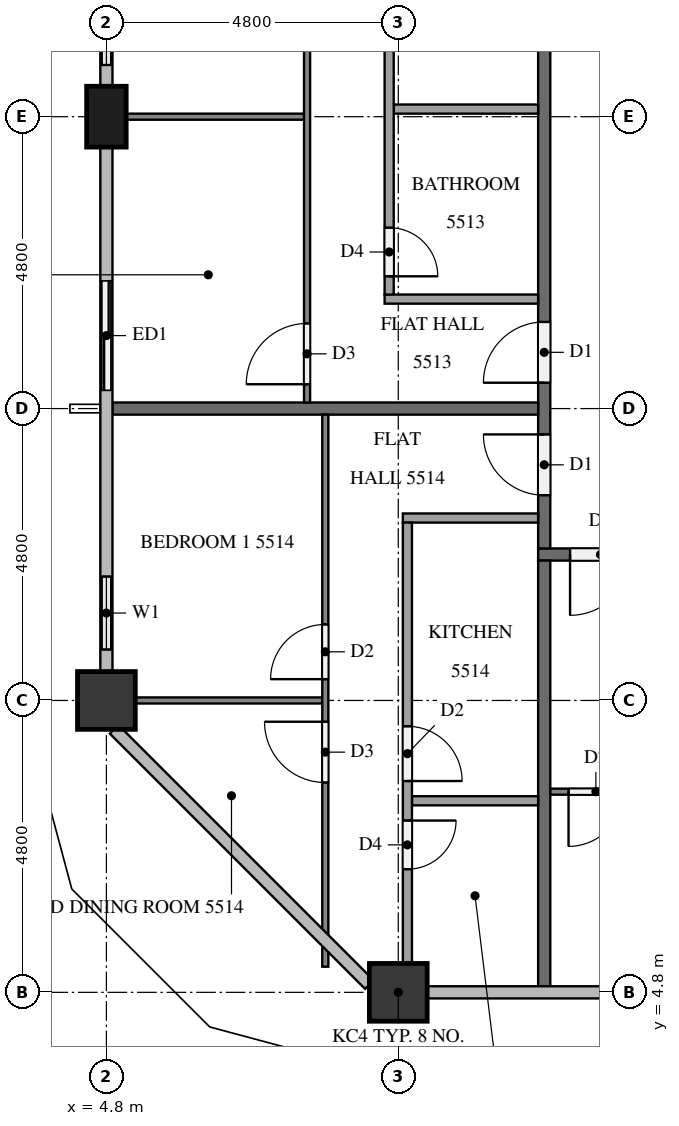
"""IFC4 building model, lengths in metres.
Left out: names, types, materials, properties, quantities, classifications, styles, units other than length and angle.
Written with IfcOpenShell. Run it as: python <this file> out.ifc"""

import sys

from ifc_helpers import new_model, si_unit, direction, frame, frame_2d, origin, origin_2d, place, context, subcontext, project, spatial, rectangle, extrude, element, fill, save


model = new_model("IFC4")
c1 = context("Model", 3, precision=1e-05, world=origin(), true_north=direction((0.0, 1.0)))
c2 = subcontext(c1, "Body", "Model", "MODEL_VIEW")
j1 = project(units=[si_unit("LENGTHUNIT", "METRE"), si_unit("PLANEANGLEUNIT", "RADIAN")], contexts=[c1])
p1 = place(None, origin())
s1 = spatial("IfcSite", under=j1, at=p1, CompositionType="ELEMENT")
p2 = place(p1, origin())
s2 = spatial("IfcBuilding", under=s1, at=p2, CompositionType="ELEMENT")
p3 = place(p2, frame((0.0, 0.0, 212.3)))
s3 = spatial("IfcBuildingStorey", under=s2, at=p3, CompositionType="ELEMENT", Elevation=212.3)
p4 = place(p3, frame((9.6, 4.8, 0.0), z_axis=(0.0, 0.0, 1.0), x_axis=(1.0, 0.0, 0.0)))
e1 = element("IfcColumn", 1, at=p4, inside=s3, PredefinedType="COLUMN", context=c2, shape_type="SweptSolid", body=[
    extrude(rectangle(XDim=0.95, YDim=0.95, at=origin_2d()), origin(), (0.0, 0.0, 1.0), 3.2),
])
p5 = place(p3, frame((4.8, 19.2, 0.0), z_axis=(0.0, 0.0, 1.0), x_axis=(0.0, 1.0, 0.0)))
e2 = element("IfcColumn", 2, at=p5, inside=s3, PredefinedType="COLUMN", context=c2, shape_type="SweptSolid", body=[
    extrude(rectangle(XDim=1.0, YDim=0.65, at=origin_2d()), origin(), (0.0, 0.0, 1.0), 3.2),
])
p6 = place(p3, frame((4.8, 9.6, 0.0), z_axis=(0.0, 0.0, 1.0), x_axis=(1.0, 0.0, 0.0)))
e3 = element("IfcColumn", 3, at=p6, inside=s3, PredefinedType="COLUMN", context=c2, shape_type="SweptSolid", body=[
    extrude(rectangle(XDim=0.95, YDim=0.95, at=origin_2d()), origin(), (0.0, 0.0, 1.0), 3.2),
])
p7 = place(p3, frame((4.8, 21.6, 0.0), z_axis=(0.0, 0.0, 1.0), x_axis=(0.0, -1.0, 0.0)))
e4 = element("IfcWall", 4, at=p7, inside=s3, PredefinedType="SOLIDWALL", context=c2, shape_type="SweptSolid", body=[
    extrude(rectangle(XDim=1.9, YDim=0.15, at=frame_2d((0.95, 0.0))), origin(), (0.0, 0.0, 1.0), 3.2),
])
p8 = place(p7, frame((0.35, 0.0, 0.9)))
e5 = element("IfcOpeningElement", 5, at=p8, cuts=e4, PredefinedType="OPENING", context=c2, shape_type="SweptSolid", body=[
    extrude(rectangle(XDim=1.2, YDim=1.4, at=frame_2d((0.6, 0.7))), frame((0.0, 0.085, 0.0), z_axis=(0.0, -1.0, 0.0), x_axis=(1.0, 0.0, 0.0)), (0.0, 0.0, 1.0), 0.17),
])
p9 = place(p3, frame((4.8, 16.8, 0.0), z_axis=(0.0, 0.0, 1.0), x_axis=(0.0, -1.0, 0.0)))
e6 = element("IfcWall", 6, at=p9, inside=s3, PredefinedType="SOLIDWALL", context=c2, shape_type="SweptSolid", body=[
    extrude(rectangle(XDim=2.4, YDim=0.15, at=frame_2d((1.2, 0.0))), origin(), (0.0, 0.0, 1.0), 3.2),
])
p10 = place(p9, frame((0.3, 0.0, 0.0)))
e7 = element("IfcOpeningElement", 7, at=p10, cuts=e6, PredefinedType="OPENING", context=c2, shape_type="SweptSolid", body=[
    extrude(rectangle(XDim=1.8, YDim=2.4, at=frame_2d((0.9, 1.2))), frame((0.0, 0.085, 0.0), z_axis=(0.0, -1.0, 0.0), x_axis=(1.0, 0.0, 0.0)), (0.0, 0.0, 1.0), 0.17),
])
p11 = place(p3, frame((4.8, 12.0, 0.0), z_axis=(0.0, 0.0, 1.0), x_axis=(0.0, -1.0, 0.0)))
e8 = element("IfcWall", 8, at=p11, inside=s3, PredefinedType="SOLIDWALL", context=c2, shape_type="SweptSolid", body=[
    extrude(rectangle(XDim=1.925, YDim=0.15, at=frame_2d((0.962, 0.0))), origin(), (0.0, 0.0, 1.0), 3.2),
])
p12 = place(p11, frame((0.363, 0.0, 0.9)))
e9 = element("IfcOpeningElement", 9, at=p12, cuts=e8, PredefinedType="OPENING", context=c2, shape_type="SweptSolid", body=[
    extrude(rectangle(XDim=1.2, YDim=1.4, at=frame_2d((0.6, 0.7))), frame((0.0, 0.085, 0.0), z_axis=(0.0, -1.0, 0.0), x_axis=(1.0, 0.0, 0.0)), (0.0, 0.0, 1.0), 0.17),
])
p13 = place(p3, frame((50.5, 12.0, 0.0), z_axis=(0.0, 0.0, 1.0), x_axis=(-1.0, 0.0, 0.0)))
e10 = element("IfcWall", 10, at=p13, inside=s3, PredefinedType="PARTITIONING", context=c2, shape_type="SweptSolid", body=[
    extrude(rectangle(XDim=38.6, YDim=0.2, at=frame_2d((19.3, 0.0))), origin(), (0.0, 0.0, 1.0), 3.2),
])
p14 = place(p13, frame((37.075, 0.0, 0.0)))
e11 = element("IfcOpeningElement", 11, at=p14, cuts=e10, PredefinedType="OPENING", context=c2, shape_type="SweptSolid", body=[
    extrude(rectangle(XDim=1.0, YDim=2.1, at=frame_2d((0.5, 1.05))), frame((0.0, 0.11, 0.0), z_axis=(0.0, -1.0, 0.0), x_axis=(1.0, 0.0, 0.0)), (0.0, 0.0, 1.0), 0.22),
])
p15 = place(p13, frame((20.275, 0.0, 0.0)))
e12 = element("IfcOpeningElement", 12, at=p15, cuts=e10, PredefinedType="OPENING", context=c2, shape_type="SweptSolid", body=[
    extrude(rectangle(XDim=1.0, YDim=2.1, at=frame_2d((0.5, 1.05))), frame((0.0, 0.11, 0.0), z_axis=(0.0, -1.0, 0.0), x_axis=(1.0, 0.0, 0.0)), (0.0, 0.0, 1.0), 0.22),
])
p16 = place(p13, frame((0.525, 0.0, 0.0)))
e13 = element("IfcOpeningElement", 13, at=p16, cuts=e10, PredefinedType="OPENING", context=c2, shape_type="SweptSolid", body=[
    extrude(rectangle(XDim=1.0, YDim=2.1, at=frame_2d((0.5, 1.05))), frame((0.0, 0.11, 0.0), z_axis=(0.0, -1.0, 0.0), x_axis=(1.0, 0.0, 0.0)), (0.0, 0.0, 1.0), 0.22),
])
p17 = place(p3, frame((12.0, 12.1, 0.0), z_axis=(0.0, 0.0, 1.0), x_axis=(0.0, 1.0, 0.0)))
e14 = element("IfcWall", 14, at=p17, inside=s3, PredefinedType="PARTITIONING", context=c2, shape_type="SweptSolid", body=[
    extrude(rectangle(XDim=28.6, YDim=0.2, at=frame_2d((14.3, 0.0))), origin(), (0.0, 0.0, 1.0), 3.2),
])
p18 = place(p17, frame((27.275, 0.0, 0.0)))
e15 = element("IfcOpeningElement", 15, at=p18, cuts=e14, PredefinedType="OPENING", context=c2, shape_type="SweptSolid", body=[
    extrude(rectangle(XDim=1.0, YDim=2.1, at=frame_2d((0.5, 1.05))), frame((0.0, 0.11, 0.0), z_axis=(0.0, -1.0, 0.0), x_axis=(1.0, 0.0, 0.0)), (0.0, 0.0, 1.0), 0.22),
])
p19 = place(p17, frame((12.325, 0.0, 0.0)))
e16 = element("IfcOpeningElement", 16, at=p19, cuts=e14, PredefinedType="OPENING", context=c2, shape_type="SweptSolid", body=[
    extrude(rectangle(XDim=1.0, YDim=2.1, at=frame_2d((0.5, 1.05))), frame((0.0, 0.11, 0.0), z_axis=(0.0, -1.0, 0.0), x_axis=(1.0, 0.0, 0.0)), (0.0, 0.0, 1.0), 0.22),
])
p20 = place(p17, frame((2.725, 0.0, 0.0)))
e17 = element("IfcOpeningElement", 17, at=p20, cuts=e14, PredefinedType="OPENING", context=c2, shape_type="SweptSolid", body=[
    extrude(rectangle(XDim=1.0, YDim=2.1, at=frame_2d((0.5, 1.05))), frame((0.0, 0.11, 0.0), z_axis=(0.0, -1.0, 0.0), x_axis=(1.0, 0.0, 0.0)), (0.0, 0.0, 1.0), 0.22),
])
p21 = place(p17, frame((0.875, 0.0, 0.0)))
e18 = element("IfcOpeningElement", 18, at=p21, cuts=e14, PredefinedType="OPENING", context=c2, shape_type="SweptSolid", body=[
    extrude(rectangle(XDim=1.0, YDim=2.1, at=frame_2d((0.5, 1.05))), frame((0.0, 0.11, 0.0), z_axis=(0.0, -1.0, 0.0), x_axis=(1.0, 0.0, 0.0)), (0.0, 0.0, 1.0), 0.22),
])
for number, where, z_axis, x_axis in (
    (19, (12.0, 4.9, 0.0), (0.0, 0.0, 1.0), (0.0, 1.0, 0.0)),
    (20, (4.9, 14.4, 0.0), (0.0, 0.0, 1.0), (1.0, 0.0, 0.0)),
):
    element("IfcWall", number, at=place(p3, frame(where, z_axis=z_axis, x_axis=x_axis)), inside=s3, PredefinedType="PARTITIONING", context=c2, shape_type="SweptSolid", body=[
        extrude(rectangle(XDim=7.0, YDim=0.2, at=frame_2d((3.5, 0.0))), origin(), (0.0, 0.0, 1.0), 3.2),
    ])
p22 = place(p3, frame((28.7, 8.1, 0.0), z_axis=(0.0, 0.0, 1.0), x_axis=(-1.0, 0.0, 0.0)))
e21 = element("IfcWall", 21, at=p22, inside=s3, PredefinedType="PARTITIONING", context=c2, shape_type="SweptSolid", body=[
    extrude(rectangle(XDim=16.6, YDim=0.1, at=frame_2d((8.3, 0.0))), origin(), (0.0, 0.0, 1.0), 3.2),
])
p23 = place(p22, frame((15.4, 0.0, 0.0)))
e22 = element("IfcOpeningElement", 22, at=p23, cuts=e21, PredefinedType="OPENING", context=c2, shape_type="SweptSolid", body=[
    extrude(rectangle(XDim=0.9, YDim=2.1, at=frame_2d((0.45, 1.05))), frame((0.0, 0.06, 0.0), z_axis=(0.0, -1.0, 0.0), x_axis=(1.0, 0.0, 0.0)), (0.0, 0.0, 1.0), 0.12),
])
p24 = place(p22, frame((5.05, 0.0, 0.0)))
e23 = element("IfcOpeningElement", 23, at=p24, cuts=e21, PredefinedType="OPENING", context=c2, shape_type="SweptSolid", body=[
    extrude(rectangle(XDim=1.0, YDim=2.1, at=frame_2d((0.5, 1.05))), frame((0.0, 0.06, 0.0), z_axis=(0.0, -1.0, 0.0), x_axis=(1.0, 0.0, 0.0)), (0.0, 0.0, 1.0), 0.12),
])
p25 = place(p22, frame((3.45, 0.0, 0.0)))
e24 = element("IfcOpeningElement", 24, at=p25, cuts=e21, PredefinedType="OPENING", context=c2, shape_type="SweptSolid", body=[
    extrude(rectangle(XDim=0.9, YDim=2.1, at=frame_2d((0.45, 1.05))), frame((0.0, 0.06, 0.0), z_axis=(0.0, -1.0, 0.0), x_axis=(1.0, 0.0, 0.0)), (0.0, 0.0, 1.0), 0.12),
])
p26 = place(p3, frame((8.05, 19.2, 0.0), z_axis=(0.0, 0.0, 1.0), x_axis=(-1.0, 0.0, 0.0)))
e25 = element("IfcWall", 25, at=p26, inside=s3, PredefinedType="PARTITIONING", context=c2, shape_type="SweptSolid", body=[
    extrude(rectangle(XDim=2.925, YDim=0.1, at=frame_2d((1.462, 0.0))), origin(), (0.0, 0.0, 1.0), 3.2),
])
p27 = place(p3, frame((8.1, 14.5, 0.0), z_axis=(0.0, 0.0, 1.0), x_axis=(0.0, 1.0, 0.0)))
e26 = element("IfcWall", 26, at=p27, inside=s3, PredefinedType="PARTITIONING", context=c2, shape_type="SweptSolid", body=[
    extrude(rectangle(XDim=9.4, YDim=0.1, at=frame_2d((4.7, 0.0))), origin(), (0.0, 0.0, 1.0), 3.2),
])
p28 = place(p27, frame((0.3, 0.0, 0.0)))
e27 = element("IfcOpeningElement", 27, at=p28, cuts=e26, PredefinedType="OPENING", context=c2, shape_type="SweptSolid", body=[
    extrude(rectangle(XDim=1.0, YDim=2.1, at=frame_2d((0.5, 1.05))), frame((0.0, 0.06, 0.0), z_axis=(0.0, -1.0, 0.0), x_axis=(1.0, 0.0, 0.0)), (0.0, 0.0, 1.0), 0.12),
])
p29 = place(p27, frame((8.2, 0.0, 0.0)))
e28 = element("IfcOpeningElement", 28, at=p29, cuts=e26, PredefinedType="OPENING", context=c2, shape_type="SweptSolid", body=[
    extrude(rectangle(XDim=0.9, YDim=2.1, at=frame_2d((0.45, 1.05))), frame((0.0, 0.06, 0.0), z_axis=(0.0, -1.0, 0.0), x_axis=(1.0, 0.0, 0.0)), (0.0, 0.0, 1.0), 0.12),
])
p30 = place(p3, frame((11.9, 19.325, 0.0), z_axis=(0.0, 0.0, 1.0), x_axis=(-1.0, 0.0, 0.0)))
e29 = element("IfcWall", 29, at=p30, inside=s3, PredefinedType="PARTITIONING", context=c2, shape_type="SweptSolid", body=[
    extrude(rectangle(XDim=2.375, YDim=0.15, at=frame_2d((1.188, 0.0))), origin(), (0.0, 0.0, 1.0), 3.2),
])
p31 = place(p3, frame((11.9, 16.2, 0.0), z_axis=(0.0, 0.0, 1.0), x_axis=(-1.0, 0.0, 0.0)))
e30 = element("IfcWall", 30, at=p31, inside=s3, PredefinedType="PARTITIONING", context=c2, shape_type="SweptSolid", body=[
    extrude(rectangle(XDim=2.525, YDim=0.15, at=frame_2d((1.262, 0.0))), origin(), (0.0, 0.0, 1.0), 3.2),
])
p32 = place(p3, frame((9.45, 23.9, 0.0), z_axis=(0.0, 0.0, 1.0), x_axis=(0.0, -1.0, 0.0)))
e31 = element("IfcWall", 31, at=p32, inside=s3, PredefinedType="PARTITIONING", context=c2, shape_type="SweptSolid", body=[
    extrude(rectangle(XDim=7.625, YDim=0.15, at=frame_2d((3.812, 0.0))), origin(), (0.0, 0.0, 1.0), 3.2),
])
p33 = place(p32, frame((6.525, 0.0, 0.0)))
e32 = element("IfcOpeningElement", 32, at=p33, cuts=e31, PredefinedType="OPENING", context=c2, shape_type="SweptSolid", body=[
    extrude(rectangle(XDim=0.8, YDim=2.1, at=frame_2d((0.4, 1.05))), frame((0.0, 0.085, 0.0), z_axis=(0.0, -1.0, 0.0), x_axis=(1.0, 0.0, 0.0)), (0.0, 0.0, 1.0), 0.17),
])
p34 = place(p32, frame((0.35, 0.0, 0.0)))
e33 = element("IfcOpeningElement", 33, at=p34, cuts=e31, PredefinedType="OPENING", context=c2, shape_type="SweptSolid", body=[
    extrude(rectangle(XDim=0.9, YDim=2.1, at=frame_2d((0.45, 1.05))), frame((0.0, 0.085, 0.0), z_axis=(0.0, -1.0, 0.0), x_axis=(1.0, 0.0, 0.0)), (0.0, 0.0, 1.0), 0.17),
])
p35 = place(p3, frame((8.35, 9.6, 0.0), z_axis=(0.0, 0.0, 1.0), x_axis=(-1.0, 0.0, 0.0)))
e34 = element("IfcWall", 34, at=p35, inside=s3, PredefinedType="PARTITIONING", context=c2, shape_type="SweptSolid", body=[
    extrude(rectangle(XDim=3.075, YDim=0.1, at=frame_2d((1.538, 0.0))), origin(), (0.0, 0.0, 1.0), 3.2),
])
p36 = place(p3, frame((8.4, 5.221, 0.0), z_axis=(0.0, 0.0, 1.0), x_axis=(0.0, 1.0, 0.0)))
e35 = element("IfcWall", 35, at=p36, inside=s3, PredefinedType="PARTITIONING", context=c2, shape_type="SweptSolid", body=[
    extrude(rectangle(XDim=9.079, YDim=0.1, at=frame_2d((4.539, 0.0))), origin(), (0.0, 0.0, 1.0), 3.2),
])
p37 = place(p36, frame((4.729, 0.0, 0.0)))
e36 = element("IfcOpeningElement", 36, at=p37, cuts=e35, PredefinedType="OPENING", context=c2, shape_type="SweptSolid", body=[
    extrude(rectangle(XDim=0.9, YDim=2.1, at=frame_2d((0.45, 1.05))), frame((0.0, 0.06, 0.0), z_axis=(0.0, -1.0, 0.0), x_axis=(1.0, 0.0, 0.0)), (0.0, 0.0, 1.0), 0.12),
])
p38 = place(p36, frame((3.029, 0.0, 0.0)))
e37 = element("IfcOpeningElement", 37, at=p38, cuts=e35, PredefinedType="OPENING", context=c2, shape_type="SweptSolid", body=[
    extrude(rectangle(XDim=1.0, YDim=2.1, at=frame_2d((0.5, 1.05))), frame((0.0, 0.06, 0.0), z_axis=(0.0, -1.0, 0.0), x_axis=(1.0, 0.0, 0.0)), (0.0, 0.0, 1.0), 0.12),
])
p39 = place(p3, frame((11.9, 7.95, 0.0), z_axis=(0.0, 0.0, 1.0), x_axis=(-1.0, 0.0, 0.0)))
e38 = element("IfcWall", 38, at=p39, inside=s3, PredefinedType="PARTITIONING", context=c2, shape_type="SweptSolid", body=[
    extrude(rectangle(XDim=2.075, YDim=0.15, at=frame_2d((1.038, 0.0))), origin(), (0.0, 0.0, 1.0), 3.2),
])
p40 = place(p3, frame((11.9, 12.6, 0.0), z_axis=(0.0, 0.0, 1.0), x_axis=(-1.0, 0.0, 0.0)))
e39 = element("IfcWall", 39, at=p40, inside=s3, PredefinedType="PARTITIONING", context=c2, shape_type="SweptSolid", body=[
    extrude(rectangle(XDim=2.225, YDim=0.15, at=frame_2d((1.112, 0.0))), origin(), (0.0, 0.0, 1.0), 3.2),
])
p41 = place(p3, frame((9.75, 12.525, 0.0), z_axis=(0.0, 0.0, 1.0), x_axis=(0.0, -1.0, 0.0)))
e40 = element("IfcWall", 40, at=p41, inside=s3, PredefinedType="PARTITIONING", context=c2, shape_type="SweptSolid", body=[
    extrude(rectangle(XDim=7.25, YDim=0.15, at=frame_2d((3.625, 0.0))), origin(), (0.0, 0.0, 1.0), 3.2),
])
p42 = place(p41, frame((3.35, 0.0, 0.0)))
e41 = element("IfcOpeningElement", 41, at=p42, cuts=e40, PredefinedType="OPENING", context=c2, shape_type="SweptSolid", body=[
    extrude(rectangle(XDim=0.9, YDim=2.1, at=frame_2d((0.45, 1.05))), frame((0.0, 0.085, 0.0), z_axis=(0.0, -1.0, 0.0), x_axis=(1.0, 0.0, 0.0)), (0.0, 0.0, 1.0), 0.17),
])
p43 = place(p41, frame((4.9, 0.0, 0.0)))
e42 = element("IfcOpeningElement", 42, at=p43, cuts=e40, PredefinedType="OPENING", context=c2, shape_type="SweptSolid", body=[
    extrude(rectangle(XDim=0.8, YDim=2.1, at=frame_2d((0.4, 1.05))), frame((0.0, 0.085, 0.0), z_axis=(0.0, -1.0, 0.0), x_axis=(1.0, 0.0, 0.0)), (0.0, 0.0, 1.0), 0.17),
])
p44 = place(p8, origin())
e43 = element("IfcWindow", 43, at=p44, inside=s3, PartitioningType="SINGLE_PANEL", PredefinedType="WINDOW", context=c2, shape_type="SweptSolid", body=[
    extrude(rectangle(XDim=1.2, YDim=1.4, at=frame_2d((0.6, 0.7))), frame((0.0, 0.03, 0.0), z_axis=(0.0, -1.0, 0.0), x_axis=(1.0, 0.0, 0.0)), (0.0, 0.0, 1.0), 0.06),
])
fill(e5, e43)
p45 = place(p10, origin())
e44 = element("IfcDoor", 44, at=p45, inside=s3, OperationType="SLIDING_TO_RIGHT", PredefinedType="DOOR", context=c2, shape_type="SweptSolid", body=[
    extrude(rectangle(XDim=1.8, YDim=2.4, at=frame_2d((0.9, 1.2))), frame((0.0, 0.025, 0.0), z_axis=(0.0, -1.0, 0.0), x_axis=(1.0, 0.0, 0.0)), (0.0, 0.0, 1.0), 0.05),
])
fill(e7, e44)
p46 = place(p12, origin())
e45 = element("IfcWindow", 45, at=p46, inside=s3, PartitioningType="SINGLE_PANEL", PredefinedType="WINDOW", context=c2, shape_type="SweptSolid", body=[
    extrude(rectangle(XDim=1.2, YDim=1.4, at=frame_2d((0.6, 0.7))), frame((0.0, 0.03, 0.0), z_axis=(0.0, -1.0, 0.0), x_axis=(1.0, 0.0, 0.0)), (0.0, 0.0, 1.0), 0.06),
])
fill(e9, e45)
p47 = place(p14, origin())
e46 = element("IfcDoor", 46, at=p47, inside=s3, OperationType="SINGLE_SWING_RIGHT", PredefinedType="DOOR", context=c2, shape_type="SweptSolid", body=[
    extrude(rectangle(XDim=1.0, YDim=2.1, at=frame_2d((0.5, 1.05))), frame((0.0, 0.025, 0.0), z_axis=(0.0, -1.0, 0.0), x_axis=(1.0, 0.0, 0.0)), (0.0, 0.0, 1.0), 0.05),
])
fill(e11, e46)
p48 = place(p20, origin())
e47 = element("IfcDoor", 47, at=p48, inside=s3, OperationType="SINGLE_SWING_LEFT", PredefinedType="DOOR", context=c2, shape_type="SweptSolid", body=[
    extrude(rectangle(XDim=1.0, YDim=2.1, at=frame_2d((0.5, 1.05))), frame((0.0, 0.025, 0.0), z_axis=(0.0, -1.0, 0.0), x_axis=(1.0, 0.0, 0.0)), (0.0, 0.0, 1.0), 0.05),
])
fill(e17, e47)
p49 = place(p21, origin())
e48 = element("IfcDoor", 48, at=p49, inside=s3, OperationType="SINGLE_SWING_RIGHT", PredefinedType="DOOR", context=c2, shape_type="SweptSolid", body=[
    extrude(rectangle(XDim=1.0, YDim=2.1, at=frame_2d((0.5, 1.05))), frame((0.0, 0.025, 0.0), z_axis=(0.0, -1.0, 0.0), x_axis=(1.0, 0.0, 0.0)), (0.0, 0.0, 1.0), 0.05),
])
fill(e18, e48)
p50 = place(p23, origin())
e49 = element("IfcDoor", 49, at=p50, inside=s3, OperationType="SINGLE_SWING_RIGHT", PredefinedType="DOOR", context=c2, shape_type="SweptSolid", body=[
    extrude(rectangle(XDim=0.9, YDim=2.1, at=frame_2d((0.45, 1.05))), frame((0.0, 0.025, 0.0), z_axis=(0.0, -1.0, 0.0), x_axis=(1.0, 0.0, 0.0)), (0.0, 0.0, 1.0), 0.05),
])
fill(e22, e49)
p51 = place(p28, origin())
e50 = element("IfcDoor", 50, at=p51, inside=s3, OperationType="SINGLE_SWING_LEFT", PredefinedType="DOOR", context=c2, shape_type="SweptSolid", body=[
    extrude(rectangle(XDim=1.0, YDim=2.1, at=frame_2d((0.5, 1.05))), frame((0.0, 0.025, 0.0), z_axis=(0.0, -1.0, 0.0), x_axis=(1.0, 0.0, 0.0)), (0.0, 0.0, 1.0), 0.05),
])
fill(e27, e50)
p52 = place(p33, origin())
e51 = element("IfcDoor", 51, at=p52, inside=s3, OperationType="SINGLE_SWING_RIGHT", PredefinedType="DOOR", context=c2, shape_type="SweptSolid", body=[
    extrude(rectangle(XDim=0.8, YDim=2.1, at=frame_2d((0.4, 1.05))), frame((0.0, 0.025, 0.0), z_axis=(0.0, -1.0, 0.0), x_axis=(1.0, 0.0, 0.0)), (0.0, 0.0, 1.0), 0.05),
])
fill(e32, e51)
p53 = place(p37, origin())
e52 = element("IfcDoor", 52, at=p53, inside=s3, OperationType="SINGLE_SWING_LEFT", PredefinedType="DOOR", context=c2, shape_type="SweptSolid", body=[
    extrude(rectangle(XDim=0.9, YDim=2.1, at=frame_2d((0.45, 1.05))), frame((0.0, 0.025, 0.0), z_axis=(0.0, -1.0, 0.0), x_axis=(1.0, 0.0, 0.0)), (0.0, 0.0, 1.0), 0.05),
])
fill(e36, e52)
p54 = place(p38, origin())
e53 = element("IfcDoor", 53, at=p54, inside=s3, OperationType="SINGLE_SWING_RIGHT", PredefinedType="DOOR", context=c2, shape_type="SweptSolid", body=[
    extrude(rectangle(XDim=1.0, YDim=2.1, at=frame_2d((0.5, 1.05))), frame((0.0, 0.025, 0.0), z_axis=(0.0, -1.0, 0.0), x_axis=(1.0, 0.0, 0.0)), (0.0, 0.0, 1.0), 0.05),
])
fill(e37, e53)
p55 = place(p42, origin())
e54 = element("IfcDoor", 54, at=p55, inside=s3, OperationType="SINGLE_SWING_RIGHT", PredefinedType="DOOR", context=c2, shape_type="SweptSolid", body=[
    extrude(rectangle(XDim=0.9, YDim=2.1, at=frame_2d((0.45, 1.05))), frame((0.0, 0.025, 0.0), z_axis=(0.0, -1.0, 0.0), x_axis=(1.0, 0.0, 0.0)), (0.0, 0.0, 1.0), 0.05),
])
fill(e41, e54)
p56 = place(p43, origin())
e55 = element("IfcDoor", 55, at=p56, inside=s3, OperationType="SINGLE_SWING_LEFT", PredefinedType="DOOR", context=c2, shape_type="SweptSolid", body=[
    extrude(rectangle(XDim=0.8, YDim=2.1, at=frame_2d((0.4, 1.05))), frame((0.0, 0.025, 0.0), z_axis=(0.0, -1.0, 0.0), x_axis=(1.0, 0.0, 0.0)), (0.0, 0.0, 1.0), 0.05),
])
fill(e42, e55)
save(model, sys.argv[1])
